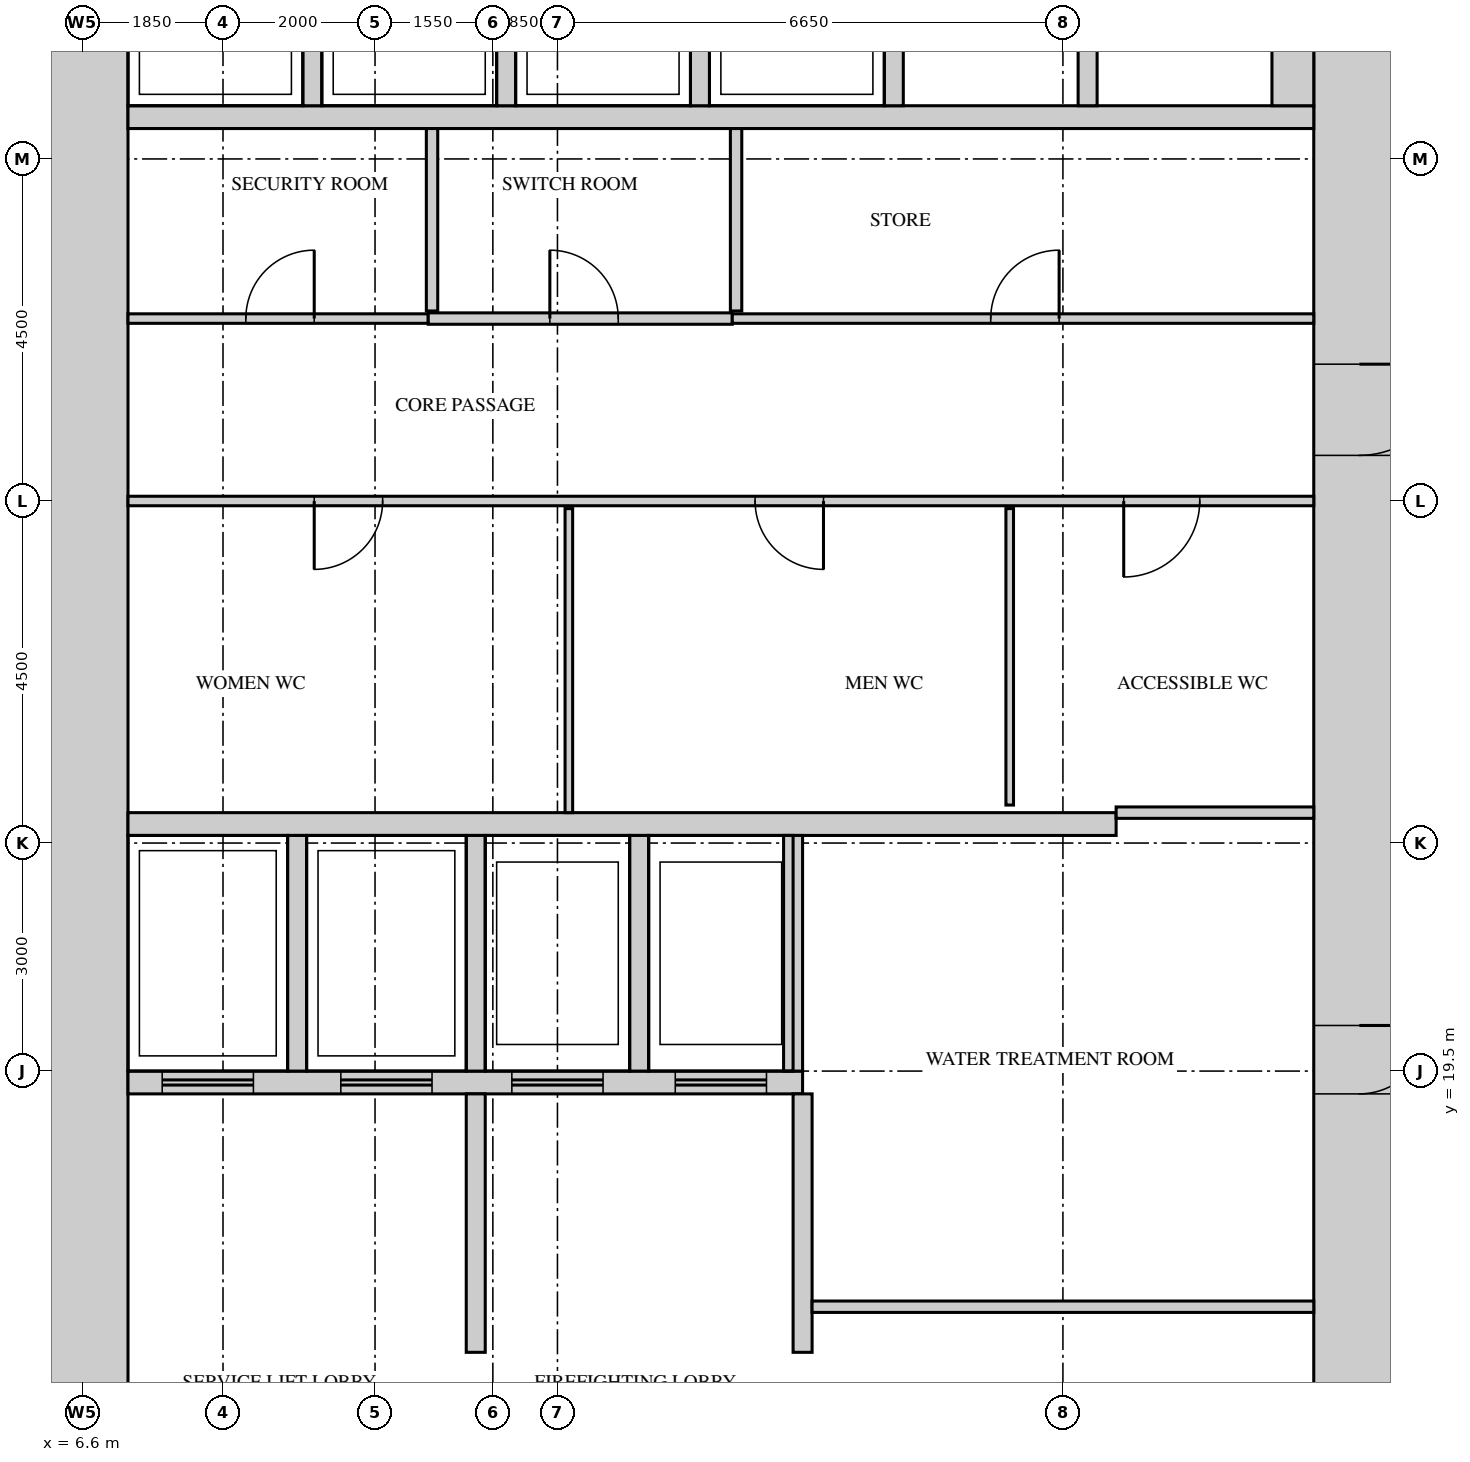
"""IFC4 building model, lengths in metres.
Left out: names, types, materials, properties, quantities, classifications, styles, units other than length and angle.
Written with IfcOpenShell. Run it as: python <this file> out.ifc"""

import sys

from ifc_helpers import new_model, si_unit, direction, frame, frame_2d, origin, place, context, subcontext, project, spatial, rectangle, extrude, source, transform, mapped, element, fill, save


model = new_model("IFC4")
c1 = context("Model", 3, precision=1e-05, world=origin(), true_north=direction((0.0, 1.0)))
c2 = subcontext(c1, "Body", "Model", "MODEL_VIEW")
j1 = project(units=[si_unit("LENGTHUNIT", "METRE"), si_unit("PLANEANGLEUNIT", "RADIAN")], contexts=[c1])
p1 = place(None, origin())
s1 = spatial("IfcSite", under=j1, at=p1, CompositionType="ELEMENT")
p2 = place(p1, origin())
s2 = spatial("IfcBuilding", under=s1, at=p2, CompositionType="ELEMENT")
p3 = place(p2, frame((0.0, 0.0, 73.5)))
s3 = spatial("IfcBuildingStorey", under=s2, at=p3, CompositionType="ELEMENT", Elevation=73.5)
m1 = source(origin(), c2, "Body", "SweptSolid", [
    extrude(rectangle(XDim=27.6, YDim=1.2, at=frame_2d((13.8, 0.0))), origin(), (0.0, 0.0, 1.0), 4.2),
])
p4 = place(p3, frame((23.4, 13.2, 0.0), z_axis=(0.0, 0.0, 1.0), x_axis=(0.0, 1.0, 0.0)))
e1 = element("IfcWall", 1, at=p4, inside=s3, PredefinedType="SHEAR", context=c2, shape_type="MappedRepresentation", body=[
    mapped(m1, transform((0.0, 0.0, 0.0))),
])
m2 = source(origin(), c2, "Body", "SweptSolid", [
    extrude(rectangle(XDim=1.8, YDim=2.1, at=frame_2d((0.9, 1.05))), frame((0.0, 0.61, 0.0), z_axis=(0.0, -1.0, 0.0), x_axis=(1.0, 0.0, 0.0)), (0.0, 0.0, 1.0), 1.22),
])
p5 = place(p4, frame((22.4, 0.0, 0.0)))
e2 = element("IfcOpeningElement", 2, at=p5, cuts=e1, PredefinedType="OPENING", context=c2, shape_type="MappedRepresentation", body=[
    mapped(m2, transform((0.0, 0.0, 0.0))),
])
m3 = source(origin(), c2, "Body", "SweptSolid", [
    extrude(rectangle(XDim=1.2, YDim=2.1, at=frame_2d((0.6, 1.05))), frame((0.0, 0.61, 0.0), z_axis=(0.0, -1.0, 0.0), x_axis=(1.0, 0.0, 0.0)), (0.0, 0.0, 1.0), 1.22),
])
p6 = place(p4, frame((14.4, 0.0, 0.0)))
e3 = element("IfcOpeningElement", 3, at=p6, cuts=e1, PredefinedType="OPENING", context=c2, shape_type="MappedRepresentation", body=[
    mapped(m3, transform((0.0, 0.0, 0.0))),
])
m4 = source(origin(), c2, "Body", "SweptSolid", [
    extrude(rectangle(XDim=0.9, YDim=2.1, at=frame_2d((0.45, 1.05))), frame((0.0, 0.61, 0.0), z_axis=(0.0, -1.0, 0.0), x_axis=(1.0, 0.0, 0.0)), (0.0, 0.0, 1.0), 1.22),
])
p7 = place(p4, frame((1.15, 0.0, 0.0)))
e4 = element("IfcOpeningElement", 4, at=p7, cuts=e1, PredefinedType="OPENING", context=c2, shape_type="MappedRepresentation", body=[
    mapped(m4, transform((0.0, 0.0, 0.0))),
])
p8 = place(p4, frame((6.0, 0.0, 0.0)))
e5 = element("IfcOpeningElement", 5, at=p8, cuts=e1, PredefinedType="OPENING", context=c2, shape_type="MappedRepresentation", body=[
    mapped(m4, transform((0.0, 0.0, 0.0))),
])
p9 = place(p3, frame((6.6, 13.2, 0.0), z_axis=(0.0, 0.0, 1.0), x_axis=(0.0, 1.0, 0.0)))
e6 = element("IfcWall", 6, at=p9, inside=s3, PredefinedType="SHEAR", context=c2, shape_type="MappedRepresentation", body=[
    mapped(m1, transform((0.0, 0.0, 0.0))),
])
m5 = source(origin(), c2, "Body", "SweptSolid", [
    extrude(rectangle(XDim=13.0, YDim=0.3, at=frame_2d((6.5, 0.0))), origin(), (0.0, 0.0, 1.0), 4.2),
])
p10 = place(p3, frame((7.2, 22.75, 0.0), z_axis=(0.0, 0.0, 1.0), x_axis=(1.0, 0.0, 0.0)))
e7 = element("IfcWall", 7, at=p10, inside=s3, PredefinedType="STANDARD", context=c2, shape_type="MappedRepresentation", body=[
    mapped(m5, transform((0.0, 0.0, 0.0))),
])
m6 = source(origin(), c2, "Body", "SweptSolid", [
    extrude(rectangle(XDim=8.875, YDim=0.3, at=frame_2d((4.438, 0.0))), origin(), (0.0, 0.0, 1.0), 4.2),
])
p11 = place(p3, frame((7.2, 19.35, 0.0), z_axis=(0.0, 0.0, 1.0), x_axis=(1.0, 0.0, 0.0)))
e8 = element("IfcWall", 8, at=p11, inside=s3, PredefinedType="STANDARD", context=c2, shape_type="MappedRepresentation", body=[
    mapped(m6, transform((0.0, 0.0, 0.0))),
])
m7 = source(origin(), c2, "Body", "SweptSolid", [
    extrude(rectangle(XDim=1.2, YDim=2.1, at=frame_2d((0.6, 1.05))), frame((0.0, 0.16, 0.0), z_axis=(0.0, -1.0, 0.0), x_axis=(1.0, 0.0, 0.0)), (0.0, 0.0, 1.0), 0.32),
])
p12 = place(p11, frame((0.45, 0.0, 0.0)))
e9 = element("IfcOpeningElement", 9, at=p12, cuts=e8, PredefinedType="OPENING", context=c2, shape_type="MappedRepresentation", body=[
    mapped(m7, transform((0.0, 0.0, 0.0))),
])
p13 = place(p11, frame((2.8, 0.0, 0.0)))
e10 = element("IfcOpeningElement", 10, at=p13, cuts=e8, PredefinedType="OPENING", context=c2, shape_type="MappedRepresentation", body=[
    mapped(m7, transform((0.0, 0.0, 0.0))),
])
p14 = place(p11, frame((5.05, 0.0, 0.0)))
e11 = element("IfcOpeningElement", 11, at=p14, cuts=e8, PredefinedType="OPENING", context=c2, shape_type="MappedRepresentation", body=[
    mapped(m7, transform((0.0, 0.0, 0.0))),
])
p15 = place(p11, frame((7.2, 0.0, 0.0)))
e12 = element("IfcOpeningElement", 12, at=p15, cuts=e8, PredefinedType="OPENING", context=c2, shape_type="MappedRepresentation", body=[
    mapped(m7, transform((0.0, 0.0, 0.0))),
])
m8 = source(origin(), c2, "Body", "SweptSolid", [
    extrude(rectangle(XDim=15.6, YDim=0.3, at=frame_2d((7.8, 0.0))), origin(), (0.0, 0.0, 1.0), 4.2),
])
p16 = place(p3, frame((7.2, 32.05, 0.0), z_axis=(0.0, 0.0, 1.0), x_axis=(1.0, 0.0, 0.0)))
e13 = element("IfcWall", 13, at=p16, inside=s3, PredefinedType="STANDARD", context=c2, shape_type="MappedRepresentation", body=[
    mapped(m8, transform((0.0, 0.0, 0.0))),
])
m9 = source(origin(), c2, "Body", "SweptSolid", [
    extrude(rectangle(XDim=3.1, YDim=0.25, at=frame_2d((1.55, 0.0))), origin(), (0.0, 0.0, 1.0), 4.2),
])
for number, where, z_axis, x_axis in (
    (14, (9.425, 19.5, 0.0), (0.0, 0.0, 1.0), (0.0, 1.0, 0.0)),
    (15, (11.775, 19.5, 0.0), (0.0, 0.0, 1.0), (0.0, 1.0, 0.0)),
    (16, (13.925, 19.5, 0.0), (0.0, 0.0, 1.0), (0.0, 1.0, 0.0)),
    (17, (15.95, 19.5, 0.0), (0.0, 0.0, 1.0), (0.0, 1.0, 0.0)),
):
    element("IfcWall", number, at=place(p3, frame(where, z_axis=z_axis, x_axis=x_axis)), inside=s3, PredefinedType="STANDARD", context=c2, shape_type="MappedRepresentation", body=[
        mapped(m9, transform((0.0, 0.0, 0.0))),
    ])
m10 = source(origin(), c2, "Body", "SweptSolid", [
    extrude(rectangle(XDim=2.4, YDim=0.25, at=frame_2d((1.2, 0.0))), origin(), (0.0, 0.0, 1.0), 4.2),
])
for number, where, z_axis, x_axis in (
    (18, (9.625, 32.2, 0.0), (0.0, 0.0, 1.0), (0.0, 1.0, 0.0)),
    (19, (12.175, 32.2, 0.0), (0.0, 0.0, 1.0), (0.0, 1.0, 0.0)),
    (20, (14.725, 32.2, 0.0), (0.0, 0.0, 1.0), (0.0, 1.0, 0.0)),
    (21, (17.275, 32.2, 0.0), (0.0, 0.0, 1.0), (0.0, 1.0, 0.0)),
    (22, (19.825, 32.2, 0.0), (0.0, 0.0, 1.0), (0.0, 1.0, 0.0)),
):
    element("IfcWall", number, at=place(p3, frame(where, z_axis=z_axis, x_axis=x_axis)), inside=s3, PredefinedType="STANDARD", context=c2, shape_type="MappedRepresentation", body=[
        mapped(m10, transform((0.0, 0.0, 0.0))),
    ])
m11 = source(origin(), c2, "Body", "SweptSolid", [
    extrude(rectangle(XDim=2.4, YDim=0.55, at=frame_2d((1.2, 0.0))), origin(), (0.0, 0.0, 1.0), 4.2),
])
p17 = place(p3, frame((22.525, 32.2, 0.0), z_axis=(0.0, 0.0, 1.0), x_axis=(0.0, 1.0, 0.0)))
e23 = element("IfcWall", 23, at=p17, inside=s3, PredefinedType="STANDARD", context=c2, shape_type="MappedRepresentation", body=[
    mapped(m11, transform((0.0, 0.0, 0.0))),
])
m12 = source(origin(), c2, "Body", "SweptSolid", [
    extrude(rectangle(XDim=3.4, YDim=0.25, at=frame_2d((1.7, 0.0))), origin(), (0.0, 0.0, 1.0), 4.2),
])
for number, where, z_axis, x_axis in (
    (24, (16.075, 15.8, 0.0), (0.0, 0.0, 1.0), (0.0, 1.0, 0.0)),
    (25, (11.775, 15.8, 0.0), (0.0, 0.0, 1.0), (0.0, 1.0, 0.0)),
):
    element("IfcWall", number, at=place(p3, frame(where, z_axis=z_axis, x_axis=x_axis)), inside=s3, PredefinedType="STANDARD", context=c2, shape_type="MappedRepresentation", body=[
        mapped(m12, transform((0.0, 0.0, 0.0))),
    ])
m13 = source(origin(), c2, "Body", "SweptSolid", [
    extrude(rectangle(XDim=6.6, YDim=0.15, at=frame_2d((3.3, 0.0))), origin(), (0.0, 0.0, 1.0), 4.3),
])
p18 = place(p3, frame((16.2, 16.4, 0.0), z_axis=(0.0, 0.0, 1.0), x_axis=(1.0, 0.0, 0.0)))
e26 = element("IfcWall", 26, at=p18, inside=s3, PredefinedType="PARTITIONING", context=c2, shape_type="MappedRepresentation", body=[
    mapped(m13, transform((0.0, 0.0, 0.0))),
])
m14 = source(origin(), c2, "Body", "SweptSolid", [
    extrude(rectangle(XDim=4.0, YDim=0.1, at=frame_2d((2.0, 0.0))), origin(), (0.0, 0.0, 1.0), 4.3),
])
p19 = place(p3, frame((13.0, 22.9, 0.0), z_axis=(0.0, 0.0, 1.0), x_axis=(0.0, 1.0, 0.0)))
e27 = element("IfcWall", 27, at=p19, inside=s3, PredefinedType="PARTITIONING", context=c2, shape_type="MappedRepresentation", body=[
    mapped(m14, transform((0.0, 0.0, 0.0))),
])
m15 = source(origin(), c2, "Body", "SweptSolid", [
    extrude(rectangle(XDim=2.6, YDim=0.15, at=frame_2d((1.3, 0.0))), origin(), (0.0, 0.0, 1.0), 4.3),
])
p20 = place(p3, frame((20.2, 22.9, 0.0), z_axis=(0.0, 0.0, 1.0), x_axis=(1.0, 0.0, 0.0)))
e28 = element("IfcWall", 28, at=p20, inside=s3, PredefinedType="PARTITIONING", context=c2, shape_type="MappedRepresentation", body=[
    mapped(m15, transform((0.0, 0.0, 0.0))),
])
m16 = source(origin(), c2, "Body", "SweptSolid", [
    extrude(rectangle(XDim=3.9, YDim=0.1, at=frame_2d((1.95, 0.0))), origin(), (0.0, 0.0, 1.0), 4.3),
])
p21 = place(p3, frame((18.8, 23.0, 0.0), z_axis=(0.0, 0.0, 1.0), x_axis=(0.0, 1.0, 0.0)))
e29 = element("IfcWall", 29, at=p21, inside=s3, PredefinedType="PARTITIONING", context=c2, shape_type="MappedRepresentation", body=[
    mapped(m16, transform((0.0, 0.0, 0.0))),
])
m17 = source(origin(), c2, "Body", "SweptSolid", [
    extrude(rectangle(XDim=15.6, YDim=0.125, at=frame_2d((7.8, 0.0))), origin(), (0.0, 0.0, 1.0), 4.3),
])
p22 = place(p3, frame((7.2, 27.0, 0.0), z_axis=(0.0, 0.0, 1.0), x_axis=(1.0, 0.0, 0.0)))
e30 = element("IfcWall", 30, at=p22, inside=s3, PredefinedType="PARTITIONING", context=c2, shape_type="MappedRepresentation", body=[
    mapped(m17, transform((0.0, 0.0, 0.0))),
])
m18 = source(origin(), c2, "Body", "SweptSolid", [
    extrude(rectangle(XDim=0.9, YDim=2.1, at=frame_2d((0.45, 1.05))), frame((0.0, 0.073, 0.0), z_axis=(0.0, -1.0, 0.0), x_axis=(1.0, 0.0, 0.0)), (0.0, 0.0, 1.0), 0.145),
])
p23 = place(p22, frame((2.45, 0.0, 0.0)))
e31 = element("IfcOpeningElement", 31, at=p23, cuts=e30, PredefinedType="OPENING", context=c2, shape_type="MappedRepresentation", body=[
    mapped(m18, transform((0.0, 0.0, 0.0))),
])
p24 = place(p22, frame((8.25, 0.0, 0.0)))
e32 = element("IfcOpeningElement", 32, at=p24, cuts=e30, PredefinedType="OPENING", context=c2, shape_type="MappedRepresentation", body=[
    mapped(m18, transform((0.0, 0.0, 0.0))),
])
m19 = source(origin(), c2, "Body", "SweptSolid", [
    extrude(rectangle(XDim=1.0, YDim=2.1, at=frame_2d((0.5, 1.05))), frame((0.0, 0.073, 0.0), z_axis=(0.0, -1.0, 0.0), x_axis=(1.0, 0.0, 0.0)), (0.0, 0.0, 1.0), 0.145),
])
p25 = place(p22, frame((13.1, 0.0, 0.0)))
e33 = element("IfcOpeningElement", 33, at=p25, cuts=e30, PredefinedType="OPENING", context=c2, shape_type="MappedRepresentation", body=[
    mapped(m19, transform((0.0, 0.0, 0.0))),
])
m20 = source(origin(), c2, "Body", "SweptSolid", [
    extrude(rectangle(XDim=3.95, YDim=0.125, at=frame_2d((1.975, 0.0))), origin(), (0.0, 0.0, 1.0), 4.3),
])
p26 = place(p3, frame((7.2, 29.4, 0.0), z_axis=(0.0, 0.0, 1.0), x_axis=(1.0, 0.0, 0.0)))
e34 = element("IfcWall", 34, at=p26, inside=s3, PredefinedType="PARTITIONING", context=c2, shape_type="MappedRepresentation", body=[
    mapped(m20, transform((0.0, 0.0, 0.0))),
])
p27 = place(p26, frame((1.55, 0.0, 0.0)))
e35 = element("IfcOpeningElement", 35, at=p27, cuts=e34, PredefinedType="OPENING", context=c2, shape_type="MappedRepresentation", body=[
    mapped(m18, transform((0.0, 0.0, 0.0))),
])
m21 = source(origin(), c2, "Body", "SweptSolid", [
    extrude(rectangle(XDim=4.0, YDim=0.15, at=frame_2d((2.0, 0.0))), origin(), (0.0, 0.0, 1.0), 4.3),
])
p28 = place(p3, frame((11.15, 29.4, 0.0), z_axis=(0.0, 0.0, 1.0), x_axis=(1.0, 0.0, 0.0)))
e36 = element("IfcWall", 36, at=p28, inside=s3, PredefinedType="PARTITIONING", context=c2, shape_type="MappedRepresentation", body=[
    mapped(m21, transform((0.0, 0.0, 0.0))),
])
m22 = source(origin(), c2, "Body", "SweptSolid", [
    extrude(rectangle(XDim=0.9, YDim=2.1, at=frame_2d((0.45, 1.05))), frame((0.0, 0.085, 0.0), z_axis=(0.0, -1.0, 0.0), x_axis=(1.0, 0.0, 0.0)), (0.0, 0.0, 1.0), 0.17),
])
p29 = place(p28, frame((1.6, 0.0, 0.0)))
e37 = element("IfcOpeningElement", 37, at=p29, cuts=e36, PredefinedType="OPENING", context=c2, shape_type="MappedRepresentation", body=[
    mapped(m22, transform((0.0, 0.0, 0.0))),
])
m23 = source(origin(), c2, "Body", "SweptSolid", [
    extrude(rectangle(XDim=7.65, YDim=0.125, at=frame_2d((3.825, 0.0))), origin(), (0.0, 0.0, 1.0), 4.3),
])
p30 = place(p3, frame((15.15, 29.4, 0.0), z_axis=(0.0, 0.0, 1.0), x_axis=(1.0, 0.0, 0.0)))
e38 = element("IfcWall", 38, at=p30, inside=s3, PredefinedType="PARTITIONING", context=c2, shape_type="MappedRepresentation", body=[
    mapped(m23, transform((0.0, 0.0, 0.0))),
])
p31 = place(p30, frame((3.4, 0.0, 0.0)))
e39 = element("IfcOpeningElement", 39, at=p31, cuts=e38, PredefinedType="OPENING", context=c2, shape_type="MappedRepresentation", body=[
    mapped(m18, transform((0.0, 0.0, 0.0))),
])
m24 = source(origin(), c2, "Body", "SweptSolid", [
    extrude(rectangle(XDim=2.4, YDim=0.15, at=frame_2d((1.2, 0.0))), origin(), (0.0, 0.0, 1.0), 4.3),
])
for number, where, z_axis, x_axis in (
    (40, (11.2, 29.5, 0.0), (0.0, 0.0, 1.0), (0.0, 1.0, 0.0)),
    (41, (15.2, 29.5, 0.0), (0.0, 0.0, 1.0), (0.0, 1.0, 0.0)),
):
    element("IfcWall", number, at=place(p3, frame(where, z_axis=z_axis, x_axis=x_axis)), inside=s3, PredefinedType="PARTITIONING", context=c2, shape_type="MappedRepresentation", body=[
        mapped(m24, transform((0.0, 0.0, 0.0))),
    ])
m25 = source(origin(), c2, "Body", "SweptSolid", [
    extrude(rectangle(XDim=1.2, YDim=2.1, at=frame_2d((0.6, 1.05))), frame((0.0, 0.55, 0.0), z_axis=(0.0, -1.0, 0.0), x_axis=(1.0, 0.0, 0.0)), (0.0, 0.0, 1.0), 1.1),
])
p32 = place(p6, origin())
e42 = element("IfcDoor", 42, at=p32, inside=s3, OperationType="SINGLE_SWING_RIGHT", PredefinedType="DOOR", context=c2, shape_type="MappedRepresentation", body=[
    mapped(m25, transform((0.0, 0.0, 0.0))),
])
fill(e3, e42)
m26 = source(origin(), c2, "Body", "SweptSolid", [
    extrude(rectangle(XDim=0.9, YDim=2.1, at=frame_2d((0.45, 1.05))), frame((0.0, 0.025, 0.0), z_axis=(0.0, -1.0, 0.0), x_axis=(1.0, 0.0, 0.0)), (0.0, 0.0, 1.0), 0.05),
])
p33 = place(p27, origin())
e43 = element("IfcDoor", 43, at=p33, inside=s3, OperationType="SINGLE_SWING_LEFT", PredefinedType="DOOR", context=c2, shape_type="MappedRepresentation", body=[
    mapped(m26, transform((0.0, 0.0, 0.0))),
])
fill(e35, e43)
p34 = place(p29, origin())
e44 = element("IfcDoor", 44, at=p34, inside=s3, OperationType="SINGLE_SWING_RIGHT", PredefinedType="DOOR", context=c2, shape_type="MappedRepresentation", body=[
    mapped(m26, transform((0.0, 0.0, 0.0))),
])
fill(e37, e44)
p35 = place(p31, origin())
e45 = element("IfcDoor", 45, at=p35, inside=s3, OperationType="SINGLE_SWING_LEFT", PredefinedType="DOOR", context=c2, shape_type="MappedRepresentation", body=[
    mapped(m26, transform((0.0, 0.0, 0.0))),
])
fill(e39, e45)
p36 = place(p23, origin())
e46 = element("IfcDoor", 46, at=p36, inside=s3, OperationType="SINGLE_SWING_LEFT", PredefinedType="DOOR", context=c2, shape_type="MappedRepresentation", body=[
    mapped(m26, transform((0.0, 0.0, 0.0))),
])
fill(e31, e46)
p37 = place(p24, origin())
e47 = element("IfcDoor", 47, at=p37, inside=s3, OperationType="SINGLE_SWING_RIGHT", PredefinedType="DOOR", context=c2, shape_type="MappedRepresentation", body=[
    mapped(m26, transform((0.0, 0.0, 0.0))),
])
fill(e32, e47)
m27 = source(origin(), c2, "Body", "SweptSolid", [
    extrude(rectangle(XDim=1.0, YDim=2.1, at=frame_2d((0.5, 1.05))), frame((0.0, 0.025, 0.0), z_axis=(0.0, -1.0, 0.0), x_axis=(1.0, 0.0, 0.0)), (0.0, 0.0, 1.0), 0.05),
])
p38 = place(p25, origin())
e48 = element("IfcDoor", 48, at=p38, inside=s3, OperationType="SINGLE_SWING_LEFT", PredefinedType="DOOR", context=c2, shape_type="MappedRepresentation", body=[
    mapped(m27, transform((0.0, 0.0, 0.0))),
])
fill(e33, e48)
m28 = source(origin(), c2, "Body", "SweptSolid", [
    extrude(rectangle(XDim=0.9, YDim=2.1, at=frame_2d((0.45, 1.05))), frame((0.0, 0.55, 0.0), z_axis=(0.0, -1.0, 0.0), x_axis=(1.0, 0.0, 0.0)), (0.0, 0.0, 1.0), 1.1),
])
p39 = place(p8, origin())
e49 = element("IfcDoor", 49, at=p39, inside=s3, OperationType="SINGLE_SWING_RIGHT", PredefinedType="DOOR", context=c2, shape_type="MappedRepresentation", body=[
    mapped(m28, transform((0.0, 0.0, 0.0))),
])
fill(e5, e49)
m29 = source(origin(), c2, "Body", "SweptSolid", [
    extrude(rectangle(XDim=1.2, YDim=2.1, at=frame_2d((0.6, 1.05))), frame((0.0, 0.025, 0.0), z_axis=(0.0, -1.0, 0.0), x_axis=(1.0, 0.0, 0.0)), (0.0, 0.0, 1.0), 0.05),
])
p40 = place(p12, origin())
e50 = element("IfcDoor", 50, at=p40, inside=s3, OperationType="DOUBLE_DOOR_SLIDING", PredefinedType="DOOR", context=c2, shape_type="MappedRepresentation", body=[
    mapped(m29, transform((0.0, 0.0, 0.0))),
])
fill(e9, e50)
p41 = place(p13, origin())
e51 = element("IfcDoor", 51, at=p41, inside=s3, OperationType="DOUBLE_DOOR_SLIDING", PredefinedType="DOOR", context=c2, shape_type="MappedRepresentation", body=[
    mapped(m29, transform((0.0, 0.0, 0.0))),
])
fill(e10, e51)
p42 = place(p14, origin())
e52 = element("IfcDoor", 52, at=p42, inside=s3, OperationType="DOUBLE_DOOR_SLIDING", PredefinedType="DOOR", context=c2, shape_type="MappedRepresentation", body=[
    mapped(m29, transform((0.0, 0.0, 0.0))),
])
fill(e11, e52)
p43 = place(p15, origin())
e53 = element("IfcDoor", 53, at=p43, inside=s3, OperationType="DOUBLE_DOOR_SLIDING", PredefinedType="DOOR", context=c2, shape_type="MappedRepresentation", body=[
    mapped(m29, transform((0.0, 0.0, 0.0))),
])
fill(e12, e53)
save(model, sys.argv[1])
